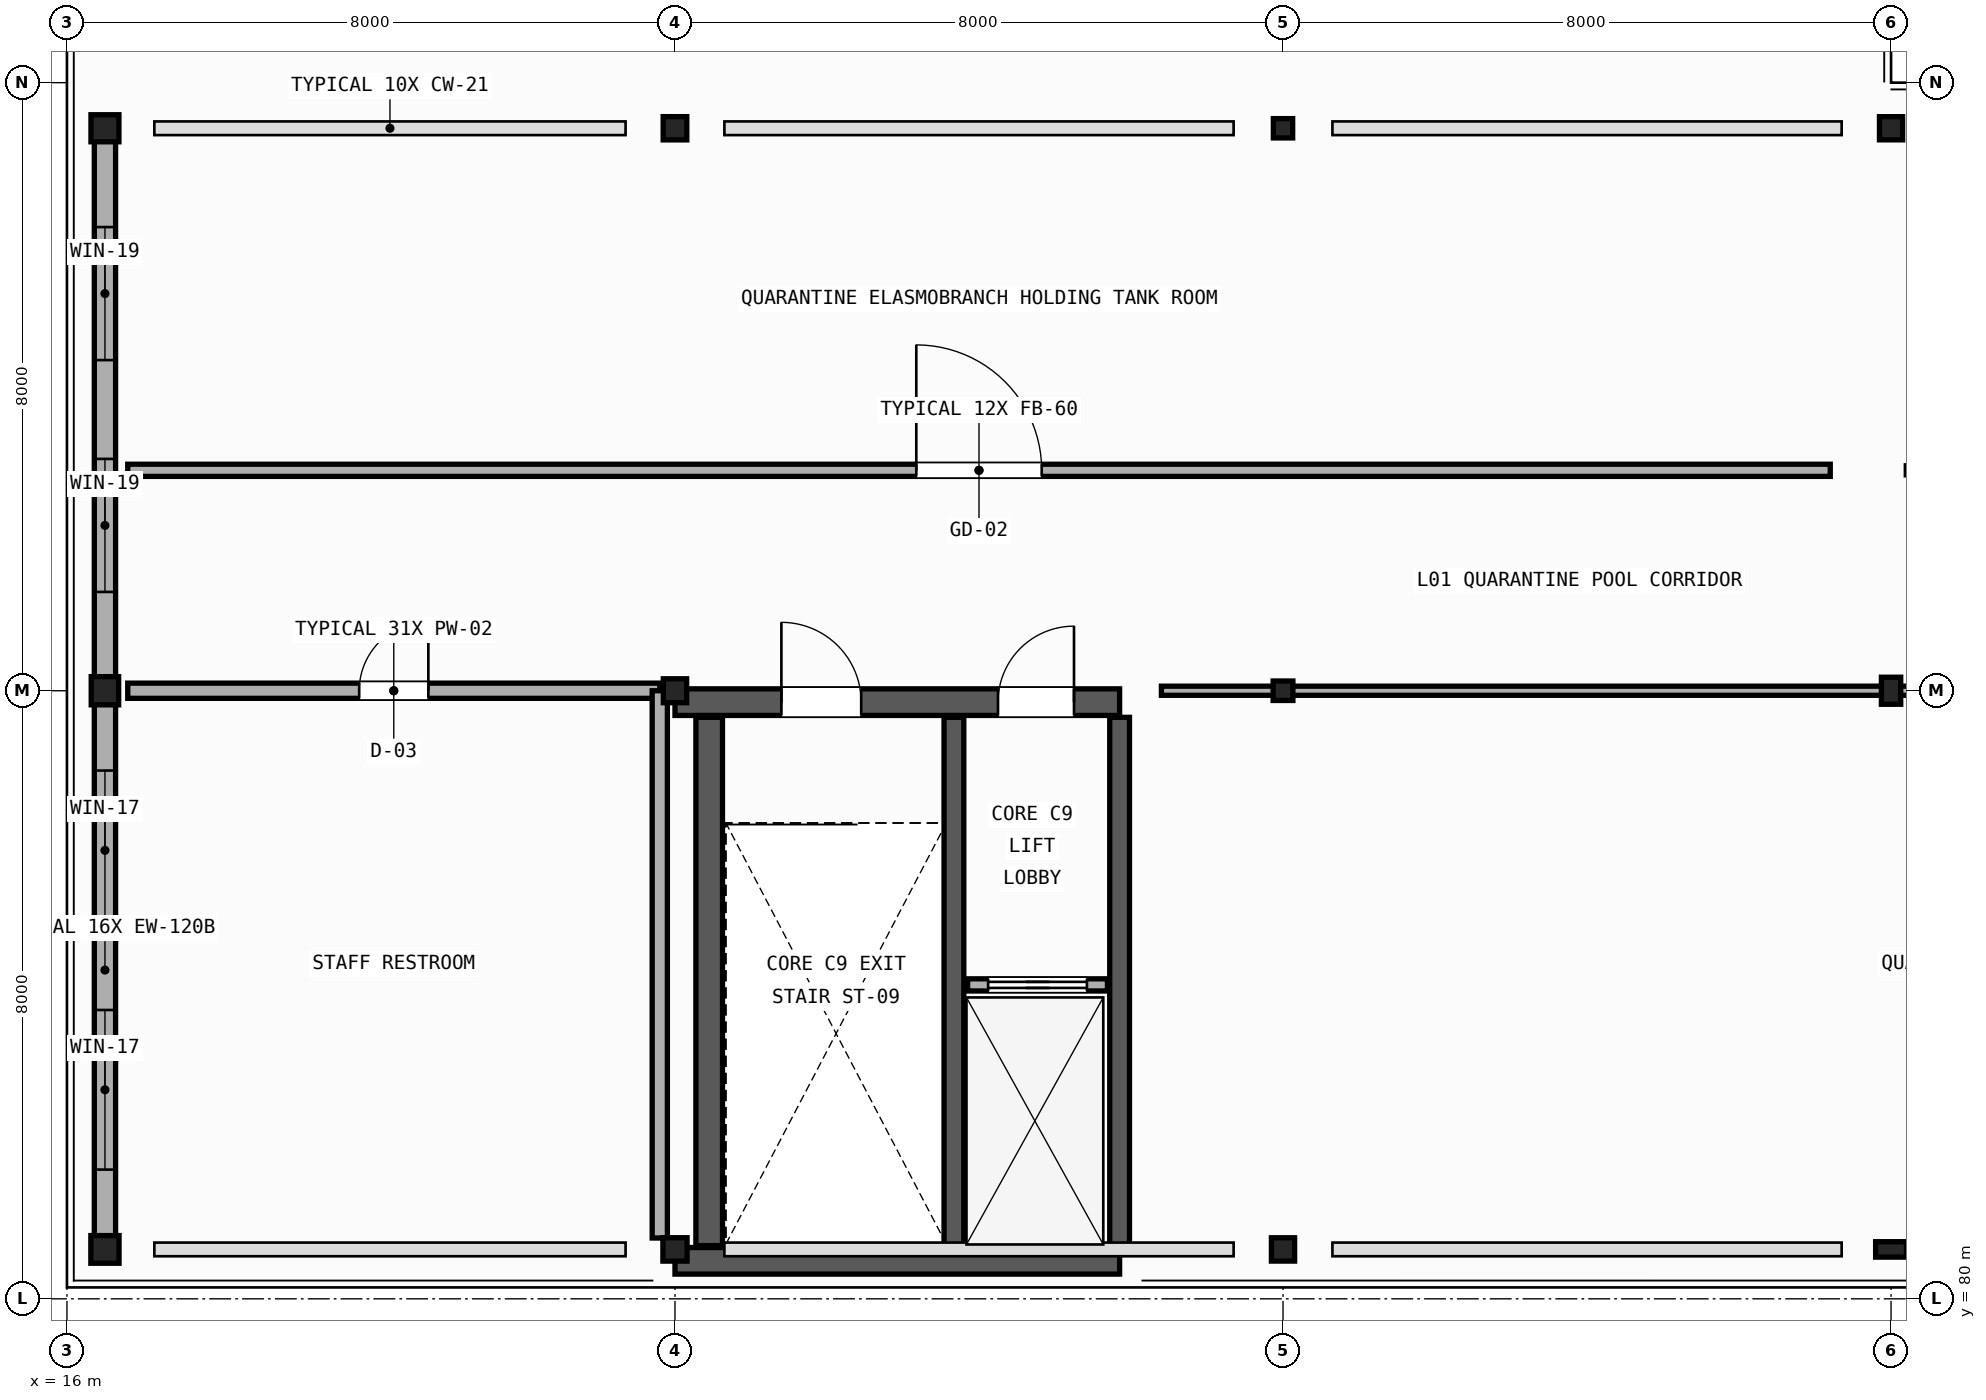
"""IFC4 building model, lengths in metres.
Left out: names, types, materials, properties, quantities, classifications, styles, units other than length and angle.
Written with IfcOpenShell. Run it as: python <this file> out.ifc"""

import sys

from ifc_helpers import new_model, si_unit, direction, frame, frame_2d, origin, origin_2d, place, context, subcontext, project, spatial, rectangle, hollow_rectangle, i_section, extrude, element, fill, save


model = new_model("IFC4")
c1 = context("Model", 3, precision=1e-05, world=origin(), true_north=direction((0.0, 1.0)))
c2 = subcontext(c1, "Body", "Model", "MODEL_VIEW")
j1 = project(units=[si_unit("LENGTHUNIT", "METRE"), si_unit("PLANEANGLEUNIT", "RADIAN")], contexts=[c1])
p1 = place(None, origin())
s1 = spatial("IfcSite", under=j1, at=p1, CompositionType="ELEMENT")
p2 = place(p1, origin())
s2 = spatial("IfcBuilding", under=s1, at=p2, CompositionType="ELEMENT")
p3 = place(p2, frame((0.0, 0.0, 5.4)))
s3 = spatial("IfcBuildingStorey", under=s2, at=p3, CompositionType="ELEMENT", Elevation=5.4)
p4 = place(p3, frame((16.5, 80.65, 0.0), z_axis=(0.0, 0.0, 1.0), x_axis=(1.0, 0.0, 0.0)))
e1 = element("IfcColumn", 1, at=p4, inside=s3, PredefinedType="COLUMN", context=c2, shape_type="SweptSolid", body=[
    extrude(i_section(OverallWidth=0.371, OverallDepth=0.364, WebThickness=0.013, FlangeThickness=0.022, FilletRadius=0.015, at=origin_2d()), origin(), (0.0, 0.0, 1.0), 4.8),
])
p5 = place(p3, frame((16.5, 88.0, 0.0), z_axis=(0.0, 0.0, 1.0), x_axis=(0.0, 1.0, 0.0)))
e2 = element("IfcColumn", 2, at=p5, inside=s3, PredefinedType="COLUMN", context=c2, shape_type="SweptSolid", body=[
    extrude(i_section(OverallWidth=0.371, OverallDepth=0.361, WebThickness=0.012, FlangeThickness=0.02, FilletRadius=0.015, at=origin_2d()), origin(), (0.0, 0.0, 1.0), 4.8),
])
p6 = place(p3, frame((16.5, 95.4, 0.0), z_axis=(0.0, 0.0, 1.0), x_axis=(1.0, 0.0, 0.0)))
e3 = element("IfcColumn", 3, at=p6, inside=s3, PredefinedType="COLUMN", context=c2, shape_type="SweptSolid", body=[
    extrude(i_section(OverallWidth=0.368, OverallDepth=0.356, WebThickness=0.011, FlangeThickness=0.018, FilletRadius=0.015, at=origin_2d()), origin(), (0.0, 0.0, 1.0), 4.8),
])
p7 = place(p3, frame((24.0, 80.65, 0.0), z_axis=(0.0, 0.0, 1.0), x_axis=(0.0, 1.0, 0.0)))
e4 = element("IfcColumn", 4, at=p7, inside=s3, PredefinedType="COLUMN", context=c2, shape_type="SweptSolid", body=[
    extrude(i_section(OverallWidth=0.308, OverallDepth=0.318, WebThickness=0.013, FlangeThickness=0.021, FilletRadius=0.013, at=origin_2d()), origin(), (0.0, 0.0, 1.0), 4.8),
])
p8 = place(p3, frame((24.0, 88.0, 0.0), z_axis=(0.0, 0.0, 1.0), x_axis=(1.0, 0.0, 0.0)))
e5 = element("IfcColumn", 5, at=p8, inside=s3, PredefinedType="COLUMN", context=c2, shape_type="SweptSolid", body=[
    extrude(i_section(OverallWidth=0.307, OverallDepth=0.315, WebThickness=0.012, FlangeThickness=0.019, FilletRadius=0.013, at=origin_2d()), origin(), (0.0, 0.0, 1.0), 4.8),
])
p9 = place(p3, frame((24.0, 95.4, 0.0), z_axis=(0.0, 0.0, 1.0), x_axis=(0.0, 1.0, 0.0)))
e6 = element("IfcColumn", 6, at=p9, inside=s3, PredefinedType="COLUMN", context=c2, shape_type="SweptSolid", body=[
    extrude(i_section(OverallWidth=0.306, OverallDepth=0.311, WebThickness=0.011, FlangeThickness=0.017, FilletRadius=0.013, at=origin_2d()), origin(), (0.0, 0.0, 1.0), 4.8),
])
p10 = place(p3, frame((32.0, 80.65, 0.0), z_axis=(0.0, 0.0, 1.0), x_axis=(1.0, 0.0, 0.0)))
e7 = element("IfcColumn", 7, at=p10, inside=s3, PredefinedType="COLUMN", context=c2, shape_type="SweptSolid", body=[
    extrude(i_section(OverallWidth=0.305, OverallDepth=0.307, WebThickness=0.01, FlangeThickness=0.015, FilletRadius=0.013, at=origin_2d()), origin(), (0.0, 0.0, 1.0), 4.8),
])
p11 = place(p3, frame((32.0, 88.0, 0.0), z_axis=(0.0, 0.0, 1.0), x_axis=(0.0, 1.0, 0.0)))
e8 = element("IfcColumn", 8, at=p11, inside=s3, PredefinedType="COLUMN", context=c2, shape_type="SweptSolid", body=[
    extrude(i_section(OverallWidth=0.256, OverallDepth=0.26, WebThickness=0.011, FlangeThickness=0.017, FilletRadius=0.011, at=origin_2d()), origin(), (0.0, 0.0, 1.0), 4.8),
])
p12 = place(p3, frame((32.0, 95.4, 0.0), z_axis=(0.0, 0.0, 1.0), x_axis=(1.0, 0.0, 0.0)))
e9 = element("IfcColumn", 9, at=p12, inside=s3, PredefinedType="COLUMN", context=c2, shape_type="SweptSolid", body=[
    extrude(i_section(OverallWidth=0.254, OverallDepth=0.254, WebThickness=0.009, FlangeThickness=0.014, FilletRadius=0.011, at=origin_2d()), origin(), (0.0, 0.0, 1.0), 4.8),
])
p13 = place(p3, frame((40.0, 80.65, 0.0), z_axis=(0.0, 0.0, 1.0), x_axis=(0.0, 1.0, 0.0)))
e10 = element("IfcColumn", 10, at=p13, inside=s3, PredefinedType="COLUMN", context=c2, shape_type="SweptSolid", body=[
    extrude(hollow_rectangle(XDim=0.203, YDim=0.406, WallThickness=0.012, InnerFilletRadius=0.012, OuterFilletRadius=0.024, at=origin_2d()), origin(), (0.0, 0.0, 1.0), 4.8),
])
p14 = place(p3, frame((40.0, 88.0, 0.0), z_axis=(0.0, 0.0, 1.0), x_axis=(1.0, 0.0, 0.0)))
e11 = element("IfcColumn", 11, at=p14, inside=s3, PredefinedType="COLUMN", context=c2, shape_type="SweptSolid", body=[
    extrude(hollow_rectangle(XDim=0.254, YDim=0.356, WallThickness=0.012, InnerFilletRadius=0.012, OuterFilletRadius=0.024, at=origin_2d()), origin(), (0.0, 0.0, 1.0), 4.8),
])
p15 = place(p3, frame((40.0, 95.4, 0.0), z_axis=(0.0, 0.0, 1.0), x_axis=(0.0, 1.0, 0.0)))
e12 = element("IfcColumn", 12, at=p15, inside=s3, PredefinedType="COLUMN", context=c2, shape_type="SweptSolid", body=[
    extrude(hollow_rectangle(XDim=0.305, YDim=0.305, WallThickness=0.012, InnerFilletRadius=0.012, OuterFilletRadius=0.024, at=origin_2d()), origin(), (0.0, 0.0, 1.0), 4.8),
])
p16 = place(p3, frame((16.5, 80.65, 0.0), z_axis=(0.0, 0.0, 1.0), x_axis=(0.0, 1.0, 0.0)))
e13 = element("IfcWall", 13, at=p16, inside=s3, PredefinedType="STANDARD", context=c2, shape_type="SweptSolid", body=[
    extrude(rectangle(XDim=7.35, YDim=0.28, at=frame_2d((3.675, 0.0))), origin(), (0.0, 0.0, 1.0), 4.047),
])
p17 = place(p16, frame((1.05, 0.0, 0.85)))
e14 = element("IfcOpeningElement", 14, at=p17, cuts=e13, PredefinedType="OPENING", context=c2, shape_type="SweptSolid", body=[
    extrude(rectangle(XDim=2.1, YDim=2.65, at=frame_2d((1.05, 1.325))), frame((0.0, 0.15, 0.0), z_axis=(0.0, -1.0, 0.0), x_axis=(1.0, 0.0, 0.0)), (0.0, 0.0, 1.0), 0.3),
])
p18 = place(p16, frame((4.2, 0.0, 0.85)))
e15 = element("IfcOpeningElement", 15, at=p18, cuts=e13, PredefinedType="OPENING", context=c2, shape_type="SweptSolid", body=[
    extrude(rectangle(XDim=2.1, YDim=2.65, at=frame_2d((1.05, 1.325))), frame((0.0, 0.15, 0.0), z_axis=(0.0, -1.0, 0.0), x_axis=(1.0, 0.0, 0.0)), (0.0, 0.0, 1.0), 0.3),
])
p19 = place(p3, frame((16.5, 88.0, 0.0), z_axis=(0.0, 0.0, 1.0), x_axis=(0.0, 1.0, 0.0)))
e16 = element("IfcWall", 16, at=p19, inside=s3, PredefinedType="STANDARD", context=c2, shape_type="SweptSolid", body=[
    extrude(rectangle(XDim=7.4, YDim=0.28, at=frame_2d((3.7, 0.0))), origin(), (0.0, 0.0, 1.0), 4.047),
])
p20 = place(p19, frame((1.3, 0.0, 0.9)))
e17 = element("IfcOpeningElement", 17, at=p20, cuts=e16, PredefinedType="OPENING", context=c2, shape_type="SweptSolid", body=[
    extrude(rectangle(XDim=1.75, YDim=2.4, at=frame_2d((0.875, 1.2))), frame((0.0, 0.15, 0.0), z_axis=(0.0, -1.0, 0.0), x_axis=(1.0, 0.0, 0.0)), (0.0, 0.0, 1.0), 0.3),
])
p21 = place(p19, frame((4.35, 0.0, 0.9)))
e18 = element("IfcOpeningElement", 18, at=p21, cuts=e16, PredefinedType="OPENING", context=c2, shape_type="SweptSolid", body=[
    extrude(rectangle(XDim=1.75, YDim=2.4, at=frame_2d((0.875, 1.2))), frame((0.0, 0.15, 0.0), z_axis=(0.0, -1.0, 0.0), x_axis=(1.0, 0.0, 0.0)), (0.0, 0.0, 1.0), 0.3),
])
p22 = place(p3, frame((24.0, 87.85, 0.0), z_axis=(0.0, 0.0, 1.0), x_axis=(1.0, 0.0, 0.0)))
e19 = element("IfcWall", 19, at=p22, inside=s3, PredefinedType="SHEAR", context=c2, shape_type="SweptSolid", body=[
    extrude(rectangle(XDim=5.85, YDim=0.35, at=frame_2d((2.925, 0.0))), origin(), (0.0, 0.0, 1.0), 4.3),
])
p23 = place(p22, frame((1.4, 0.0, 0.0)))
e20 = element("IfcOpeningElement", 20, at=p23, cuts=e19, PredefinedType="OPENING", context=c2, shape_type="SweptSolid", body=[
    extrude(rectangle(XDim=1.05, YDim=2.1, at=frame_2d((0.525, 1.05))), frame((0.0, 0.185, 0.0), z_axis=(0.0, -1.0, 0.0), x_axis=(1.0, 0.0, 0.0)), (0.0, 0.0, 1.0), 0.37),
])
p24 = place(p22, frame((4.25, 0.0, 0.0)))
e21 = element("IfcOpeningElement", 21, at=p24, cuts=e19, PredefinedType="OPENING", context=c2, shape_type="SweptSolid", body=[
    extrude(rectangle(XDim=1.0, YDim=2.15, at=frame_2d((0.5, 1.075))), frame((0.0, 0.185, 0.0), z_axis=(0.0, -1.0, 0.0), x_axis=(1.0, 0.0, 0.0)), (0.0, 0.0, 1.0), 0.37),
])
p25 = place(p3, frame((24.0, 80.5, 0.0), z_axis=(0.0, 0.0, 1.0), x_axis=(1.0, 0.0, 0.0)))
e22 = element("IfcWall", 22, at=p25, inside=s3, PredefinedType="SHEAR", context=c2, shape_type="SweptSolid", body=[
    extrude(rectangle(XDim=5.85, YDim=0.35, at=frame_2d((2.925, 0.0))), origin(), (0.0, 0.0, 1.0), 4.3),
])
p26 = place(p3, frame((24.45, 80.7, 0.0), z_axis=(0.0, 0.0, 1.0), x_axis=(0.0, 1.0, 0.0)))
e23 = element("IfcWall", 23, at=p26, inside=s3, PredefinedType="SHEAR", context=c2, shape_type="SweptSolid", body=[
    extrude(rectangle(XDim=6.95, YDim=0.35, at=frame_2d((3.475, 0.0))), origin(), (0.0, 0.0, 1.0), 4.3),
])
for number, where, z_axis, x_axis in (
    (24, (29.85, 80.7, 0.0), (0.0, 0.0, 1.0), (0.0, 1.0, 0.0)),
    (25, (27.67, 80.7, 0.0), (0.0, 0.0, 1.0), (0.0, 1.0, 0.0)),
):
    element("IfcWall", number, at=place(p3, frame(where, z_axis=z_axis, x_axis=x_axis)), inside=s3, PredefinedType="SHEAR", context=c2, shape_type="SweptSolid", body=[
        extrude(rectangle(XDim=6.95, YDim=0.26, at=frame_2d((3.475, 0.0))), origin(), (0.0, 0.0, 1.0), 4.3),
    ])
p27 = place(p3, frame((27.85, 84.13, 0.0), z_axis=(0.0, 0.0, 1.0), x_axis=(1.0, 0.0, 0.0)))
e26 = element("IfcWall", 26, at=p27, inside=s3, PredefinedType="PARTITIONING", context=c2, shape_type="SweptSolid", body=[
    extrude(rectangle(XDim=1.84, YDim=0.16, at=frame_2d((0.92, 0.0))), origin(), (0.0, 0.0, 1.0), 3.6),
])
p28 = place(p27, frame((0.27, 0.0, 0.0)))
e27 = element("IfcOpeningElement", 27, at=p28, cuts=e26, PredefinedType="OPENING", context=c2, shape_type="SweptSolid", body=[
    extrude(rectangle(XDim=1.3, YDim=2.2, at=frame_2d((0.65, 1.1))), frame((0.0, 0.09, 0.0), z_axis=(0.0, -1.0, 0.0), x_axis=(1.0, 0.0, 0.0)), (0.0, 0.0, 1.0), 0.18),
])
p29 = place(p3, frame((30.4, 88.0, 0.0), z_axis=(0.0, 0.0, 1.0), x_axis=(1.0, 0.0, 0.0)))
e28 = element("IfcWall", 28, at=p29, inside=s3, PredefinedType="PARTITIONING", context=c2, shape_type="SweptSolid", body=[
    extrude(rectangle(XDim=24.6, YDim=0.12, at=frame_2d((12.3, 0.0))), origin(), (0.0, 0.0, 1.0), 4.29),
])
p30 = place(p29, frame((11.82, 0.0, 0.0)))
e29 = element("IfcOpeningElement", 29, at=p30, cuts=e28, PredefinedType="OPENING", context=c2, shape_type="SweptSolid", body=[
    extrude(rectangle(XDim=0.96, YDim=2.1, at=frame_2d((0.48, 1.05))), frame((0.0, 0.07, 0.0), z_axis=(0.0, -1.0, 0.0), x_axis=(1.0, 0.0, 0.0)), (0.0, 0.0, 1.0), 0.14),
])
p31 = place(p3, frame((16.8, 88.0, 0.0), z_axis=(0.0, 0.0, 1.0), x_axis=(1.0, 0.0, 0.0)))
e30 = element("IfcWall", 30, at=p31, inside=s3, PredefinedType="PLUMBINGWALL", context=c2, shape_type="SweptSolid", body=[
    extrude(rectangle(XDim=7.0, YDim=0.2, at=frame_2d((3.5, 0.0))), origin(), (0.0, 0.0, 1.0), 4.29),
])
p32 = place(p31, frame((3.045, 0.0, 0.0)))
e31 = element("IfcOpeningElement", 31, at=p32, cuts=e30, PredefinedType="OPENING", context=c2, shape_type="SweptSolid", body=[
    extrude(rectangle(XDim=0.91, YDim=2.1, at=frame_2d((0.455, 1.05))), frame((0.0, 0.11, 0.0), z_axis=(0.0, -1.0, 0.0), x_axis=(1.0, 0.0, 0.0)), (0.0, 0.0, 1.0), 0.22),
])
p33 = place(p3, frame((23.8, 80.8, 0.0), z_axis=(0.0, 0.0, 1.0), x_axis=(0.0, 1.0, 0.0)))
e32 = element("IfcWall", 32, at=p33, inside=s3, PredefinedType="PLUMBINGWALL", context=c2, shape_type="SweptSolid", body=[
    extrude(rectangle(XDim=7.2, YDim=0.2, at=frame_2d((3.6, 0.0))), origin(), (0.0, 0.0, 1.0), 4.29),
])
p34 = place(p3, frame((16.8, 90.9, 0.0), z_axis=(0.0, 0.0, 1.0), x_axis=(1.0, 0.0, 0.0)))
e33 = element("IfcWall", 33, at=p34, inside=s3, PredefinedType="PARTITIONING", context=c2, shape_type="SweptSolid", body=[
    extrude(rectangle(XDim=22.4, YDim=0.16, at=frame_2d((11.2, 0.0))), origin(), (0.0, 0.0, 1.0), 4.29),
])
p35 = place(p34, frame((10.375, 0.0, 0.0)))
e34 = element("IfcOpeningElement", 34, at=p35, cuts=e33, PredefinedType="OPENING", context=c2, shape_type="SweptSolid", body=[
    extrude(rectangle(XDim=1.65, YDim=2.35, at=frame_2d((0.825, 1.175))), frame((0.0, 0.09, 0.0), z_axis=(0.0, -1.0, 0.0), x_axis=(1.0, 0.0, 0.0)), (0.0, 0.0, 1.0), 0.18),
])
p36 = place(p3, frame((40.2, 90.9, 0.0), z_axis=(0.0, 0.0, 1.0), x_axis=(1.0, 0.0, 0.0)))
e35 = element("IfcWall", 35, at=p36, inside=s3, PredefinedType="PARTITIONING", context=c2, shape_type="SweptSolid", body=[
    extrude(rectangle(XDim=14.8, YDim=0.12, at=frame_2d((7.4, 0.0))), origin(), (0.0, 0.0, 1.0), 4.29),
])
p37 = place(p36, frame((6.65, 0.0, 0.0)))
e36 = element("IfcOpeningElement", 36, at=p37, cuts=e35, PredefinedType="OPENING", context=c2, shape_type="SweptSolid", body=[
    extrude(rectangle(XDim=1.5, YDim=2.3, at=frame_2d((0.75, 1.15))), frame((0.0, 0.07, 0.0), z_axis=(0.0, -1.0, 0.0), x_axis=(1.0, 0.0, 0.0)), (0.0, 0.0, 1.0), 0.14),
])
p38 = place(p17, origin())
e37 = element("IfcWindow", 37, at=p38, inside=s3, PartitioningType="SINGLE_PANEL", PredefinedType="WINDOW", context=c2, shape_type="SweptSolid", body=[
    extrude(rectangle(XDim=2.1, YDim=2.65, at=frame_2d((1.05, 1.325))), frame((0.0, 0.03, 0.0), z_axis=(0.0, -1.0, 0.0), x_axis=(1.0, 0.0, 0.0)), (0.0, 0.0, 1.0), 0.06),
])
fill(e14, e37)
p39 = place(p18, origin())
e38 = element("IfcWindow", 38, at=p39, inside=s3, PartitioningType="SINGLE_PANEL", PredefinedType="WINDOW", context=c2, shape_type="SweptSolid", body=[
    extrude(rectangle(XDim=2.1, YDim=2.65, at=frame_2d((1.05, 1.325))), frame((0.0, 0.03, 0.0), z_axis=(0.0, -1.0, 0.0), x_axis=(1.0, 0.0, 0.0)), (0.0, 0.0, 1.0), 0.06),
])
fill(e15, e38)
p40 = place(p20, origin())
e39 = element("IfcWindow", 39, at=p40, inside=s3, PartitioningType="SINGLE_PANEL", PredefinedType="WINDOW", context=c2, shape_type="SweptSolid", body=[
    extrude(rectangle(XDim=1.75, YDim=2.4, at=frame_2d((0.875, 1.2))), frame((0.0, 0.03, 0.0), z_axis=(0.0, -1.0, 0.0), x_axis=(1.0, 0.0, 0.0)), (0.0, 0.0, 1.0), 0.06),
])
fill(e17, e39)
p41 = place(p21, origin())
e40 = element("IfcWindow", 40, at=p41, inside=s3, PartitioningType="SINGLE_PANEL", PredefinedType="WINDOW", context=c2, shape_type="SweptSolid", body=[
    extrude(rectangle(XDim=1.75, YDim=2.4, at=frame_2d((0.875, 1.2))), frame((0.0, 0.03, 0.0), z_axis=(0.0, -1.0, 0.0), x_axis=(1.0, 0.0, 0.0)), (0.0, 0.0, 1.0), 0.06),
])
fill(e18, e40)
p42 = place(p28, origin())
e41 = element("IfcDoor", 41, at=p42, inside=s3, OperationType="SLIDING_TO_LEFT", PredefinedType="DOOR", context=c2, shape_type="SweptSolid", body=[
    extrude(rectangle(XDim=1.3, YDim=2.2, at=frame_2d((0.65, 1.1))), frame((0.0, 0.025, 0.0), z_axis=(0.0, -1.0, 0.0), x_axis=(1.0, 0.0, 0.0)), (0.0, 0.0, 1.0), 0.05),
])
fill(e27, e41)
p43 = place(p23, origin())
e42 = element("IfcDoor", 42, at=p43, inside=s3, OperationType="SINGLE_SWING_LEFT", PredefinedType="DOOR", context=c2, shape_type="SweptSolid", body=[
    extrude(rectangle(XDim=1.05, YDim=2.1, at=frame_2d((0.525, 1.05))), frame((0.0, 0.025, 0.0), z_axis=(0.0, -1.0, 0.0), x_axis=(1.0, 0.0, 0.0)), (0.0, 0.0, 1.0), 0.05),
])
fill(e20, e42)
p44 = place(p24, origin())
e43 = element("IfcDoor", 43, at=p44, inside=s3, OperationType="SINGLE_SWING_RIGHT", PredefinedType="DOOR", context=c2, shape_type="SweptSolid", body=[
    extrude(rectangle(XDim=1.0, YDim=2.15, at=frame_2d((0.5, 1.075))), frame((0.0, 0.025, 0.0), z_axis=(0.0, -1.0, 0.0), x_axis=(1.0, 0.0, 0.0)), (0.0, 0.0, 1.0), 0.05),
])
fill(e21, e43)
p45 = place(p32, origin())
e44 = element("IfcDoor", 44, at=p45, inside=s3, OperationType="SINGLE_SWING_RIGHT", PredefinedType="DOOR", context=c2, shape_type="SweptSolid", body=[
    extrude(rectangle(XDim=0.91, YDim=2.1, at=frame_2d((0.455, 1.05))), frame((0.0, 0.025, 0.0), z_axis=(0.0, -1.0, 0.0), x_axis=(1.0, 0.0, 0.0)), (0.0, 0.0, 1.0), 0.05),
])
fill(e31, e44)
p46 = place(p35, origin())
e45 = element("IfcDoor", 45, at=p46, inside=s3, OperationType="SINGLE_SWING_LEFT", PredefinedType="DOOR", context=c2, shape_type="SweptSolid", body=[
    extrude(rectangle(XDim=1.65, YDim=2.35, at=frame_2d((0.825, 1.175))), frame((0.0, 0.025, 0.0), z_axis=(0.0, -1.0, 0.0), x_axis=(1.0, 0.0, 0.0)), (0.0, 0.0, 1.0), 0.05),
])
fill(e34, e45)
save(model, sys.argv[1])
